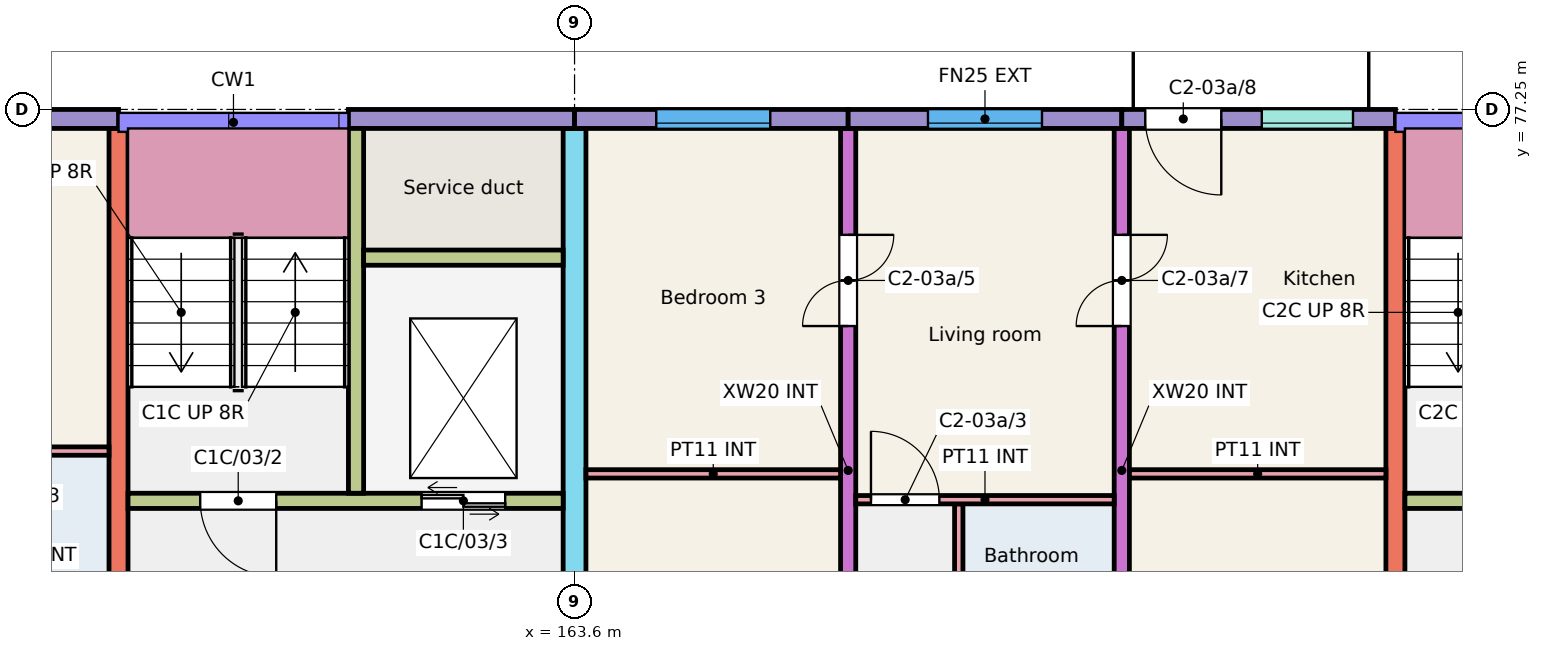
"""IFC4 building model, lengths in metres.
Left out: names, types, materials, properties, quantities, classifications, styles, units other than length and angle.
Written with IfcOpenShell. Run it as: python <this file> out.ifc"""

import sys

from ifc_helpers import new_model, si_unit, direction, frame, frame_2d, origin, place, context, subcontext, project, spatial, rectangle, extrude, element, fill, save


model = new_model("IFC4")
c1 = context("Model", 3, precision=1e-05, world=origin(), true_north=direction((0.0, 1.0)))
c2 = subcontext(c1, "Body", "Model", "MODEL_VIEW")
j1 = project(units=[si_unit("LENGTHUNIT", "METRE"), si_unit("PLANEANGLEUNIT", "RADIAN")], contexts=[c1])
p1 = place(None, origin())
s1 = spatial("IfcSite", under=j1, at=p1, CompositionType="ELEMENT")
p2 = place(p1, origin())
s2 = spatial("IfcBuilding", under=s1, at=p2, CompositionType="ELEMENT")
p3 = place(p2, frame((0.0, 0.0, 9.0)))
s3 = spatial("IfcBuildingStorey", under=s2, at=p3, CompositionType="ELEMENT", Elevation=9.0)
p4 = place(p3, frame((157.6, 68.0, 0.0), z_axis=(0.0, 0.0, 1.0), x_axis=(0.0, 1.0, 0.0)))
e1 = element("IfcWall", 1, at=p4, inside=s3, PredefinedType="SHEAR", context=c2, shape_type="SweptSolid", body=[
    extrude(rectangle(XDim=9.0, YDim=0.25, at=frame_2d((4.5, 0.0))), origin(), (0.0, 0.0, 1.0), 3.0),
])
p5 = place(p3, frame((163.6, 66.0, 0.0), z_axis=(0.0, 0.0, 1.0), x_axis=(0.0, 1.0, 0.0)))
e2 = element("IfcWall", 2, at=p5, inside=s3, PredefinedType="SHEAR", context=c2, shape_type="SweptSolid", body=[
    extrude(rectangle(XDim=11.0, YDim=0.3, at=frame_2d((5.5, 0.0))), origin(), (0.0, 0.0, 1.0), 3.0),
])
p6 = place(p5, frame((0.3, 0.0, 0.0)))
e3 = element("IfcOpeningElement", 3, at=p6, cuts=e2, PredefinedType="OPENING", context=c2, shape_type="SweptSolid", body=[
    extrude(rectangle(XDim=1.2, YDim=2.1, at=frame_2d((0.6, 1.05))), frame((0.0, 0.16, 0.0), z_axis=(0.0, -1.0, 0.0), x_axis=(1.0, 0.0, 0.0)), (0.0, 0.0, 1.0), 0.32),
])
p7 = place(p3, frame((167.2, 68.0, 0.0), z_axis=(0.0, 0.0, 1.0), x_axis=(0.0, 1.0, 0.0)))
e4 = element("IfcWall", 4, at=p7, inside=s3, PredefinedType="SHEAR", context=c2, shape_type="SweptSolid", body=[
    extrude(rectangle(XDim=9.0, YDim=0.2, at=frame_2d((4.5, 0.0))), origin(), (0.0, 0.0, 1.0), 3.0),
])
p8 = place(p7, frame((0.175, 0.0, 0.0)))
e5 = element("IfcOpeningElement", 5, at=p8, cuts=e4, PredefinedType="OPENING", context=c2, shape_type="SweptSolid", body=[
    extrude(rectangle(XDim=1.2, YDim=2.1, at=frame_2d((0.6, 1.05))), frame((0.0, 0.11, 0.0), z_axis=(0.0, -1.0, 0.0), x_axis=(1.0, 0.0, 0.0)), (0.0, 0.0, 1.0), 0.22),
])
p9 = place(p7, frame((6.4, 0.0, 0.0)))
e6 = element("IfcOpeningElement", 6, at=p9, cuts=e4, PredefinedType="OPENING", context=c2, shape_type="SweptSolid", body=[
    extrude(rectangle(XDim=1.2, YDim=2.1, at=frame_2d((0.6, 1.05))), frame((0.0, 0.11, 0.0), z_axis=(0.0, -1.0, 0.0), x_axis=(1.0, 0.0, 0.0)), (0.0, 0.0, 1.0), 0.22),
])
p10 = place(p3, frame((170.8, 68.0, 0.0), z_axis=(0.0, 0.0, 1.0), x_axis=(0.0, 1.0, 0.0)))
e7 = element("IfcWall", 7, at=p10, inside=s3, PredefinedType="SHEAR", context=c2, shape_type="SweptSolid", body=[
    extrude(rectangle(XDim=9.0, YDim=0.2, at=frame_2d((4.5, 0.0))), origin(), (0.0, 0.0, 1.0), 3.0),
])
p11 = place(p10, frame((0.175, 0.0, 0.0)))
e8 = element("IfcOpeningElement", 8, at=p11, cuts=e7, PredefinedType="OPENING", context=c2, shape_type="SweptSolid", body=[
    extrude(rectangle(XDim=1.2, YDim=2.1, at=frame_2d((0.6, 1.05))), frame((0.0, 0.11, 0.0), z_axis=(0.0, -1.0, 0.0), x_axis=(1.0, 0.0, 0.0)), (0.0, 0.0, 1.0), 0.22),
])
p12 = place(p10, frame((6.4, 0.0, 0.0)))
e9 = element("IfcOpeningElement", 9, at=p12, cuts=e7, PredefinedType="OPENING", context=c2, shape_type="SweptSolid", body=[
    extrude(rectangle(XDim=1.2, YDim=2.1, at=frame_2d((0.6, 1.05))), frame((0.0, 0.11, 0.0), z_axis=(0.0, -1.0, 0.0), x_axis=(1.0, 0.0, 0.0)), (0.0, 0.0, 1.0), 0.22),
])
p13 = place(p3, frame((174.4, 68.0, 0.0), z_axis=(0.0, 0.0, 1.0), x_axis=(0.0, 1.0, 0.0)))
e10 = element("IfcWall", 10, at=p13, inside=s3, PredefinedType="SHEAR", context=c2, shape_type="SweptSolid", body=[
    extrude(rectangle(XDim=9.0, YDim=0.25, at=frame_2d((4.5, 0.0))), origin(), (0.0, 0.0, 1.0), 3.0),
])
p14 = place(p3, frame((154.0, 77.125, 0.0), z_axis=(0.0, 0.0, 1.0), x_axis=(1.0, 0.0, 0.0)))
e11 = element("IfcWall", 11, at=p14, inside=s3, PredefinedType="SOLIDWALL", context=c2, shape_type="SweptSolid", body=[
    extrude(rectangle(XDim=3.6, YDim=0.25, at=frame_2d((1.8, 0.0))), origin(), (0.0, 0.0, 1.0), 3.0),
])
p15 = place(p14, frame((1.038, 0.0, 0.9)))
e12 = element("IfcOpeningElement", 12, at=p15, cuts=e11, PredefinedType="OPENING", context=c2, shape_type="SweptSolid", body=[
    extrude(rectangle(XDim=1.5, YDim=1.5, at=frame_2d((0.75, 0.75))), frame((0.0, 0.135, 0.0), z_axis=(0.0, -1.0, 0.0), x_axis=(1.0, 0.0, 0.0)), (0.0, 0.0, 1.0), 0.27),
])
p16 = place(p3, frame((160.625, 77.125, 0.0), z_axis=(0.0, 0.0, 1.0), x_axis=(1.0, 0.0, 0.0)))
e13 = element("IfcWall", 13, at=p16, inside=s3, PredefinedType="SOLIDWALL", context=c2, shape_type="SweptSolid", body=[
    extrude(rectangle(XDim=2.975, YDim=0.25, at=frame_2d((1.488, 0.0))), origin(), (0.0, 0.0, 1.0), 3.0),
])
p17 = place(p3, frame((157.725, 72.1, 0.0), z_axis=(0.0, 0.0, 1.0), x_axis=(1.0, 0.0, 0.0)))
e14 = element("IfcWall", 14, at=p17, inside=s3, PredefinedType="SHEAR", context=c2, shape_type="SweptSolid", body=[
    extrude(rectangle(XDim=5.725, YDim=0.2, at=frame_2d((2.862, 0.0))), origin(), (0.0, 0.0, 1.0), 3.0),
])
p18 = place(p17, frame((0.95, 0.0, 0.0)))
e15 = element("IfcOpeningElement", 15, at=p18, cuts=e14, PredefinedType="OPENING", context=c2, shape_type="SweptSolid", body=[
    extrude(rectangle(XDim=1.0, YDim=2.1, at=frame_2d((0.5, 1.05))), frame((0.0, 0.11, 0.0), z_axis=(0.0, -1.0, 0.0), x_axis=(1.0, 0.0, 0.0)), (0.0, 0.0, 1.0), 0.22),
])
p19 = place(p17, frame((3.863, 0.0, 0.0)))
e16 = element("IfcOpeningElement", 16, at=p19, cuts=e14, PredefinedType="OPENING", context=c2, shape_type="SweptSolid", body=[
    extrude(rectangle(XDim=1.1, YDim=2.1, at=frame_2d((0.55, 1.05))), frame((0.0, 0.11, 0.0), z_axis=(0.0, -1.0, 0.0), x_axis=(1.0, 0.0, 0.0)), (0.0, 0.0, 1.0), 0.22),
])
p20 = place(p3, frame((160.725, 72.2, 0.0), z_axis=(0.0, 0.0, 1.0), x_axis=(0.0, 1.0, 0.0)))
e17 = element("IfcWall", 17, at=p20, inside=s3, PredefinedType="SHEAR", context=c2, shape_type="SweptSolid", body=[
    extrude(rectangle(XDim=4.8, YDim=0.2, at=frame_2d((2.4, 0.0))), origin(), (0.0, 0.0, 1.0), 3.0),
])
p21 = place(p3, frame((160.825, 75.3, 0.0), z_axis=(0.0, 0.0, 1.0), x_axis=(1.0, 0.0, 0.0)))
e18 = element("IfcWall", 18, at=p21, inside=s3, PredefinedType="SHEAR", context=c2, shape_type="SweptSolid", body=[
    extrude(rectangle(XDim=2.625, YDim=0.2, at=frame_2d((1.312, 0.0))), origin(), (0.0, 0.0, 1.0), 3.0),
])
p22 = place(p3, frame((163.6, 77.125, 0.0), z_axis=(0.0, 0.0, 1.0), x_axis=(1.0, 0.0, 0.0)))
e19 = element("IfcWall", 19, at=p22, inside=s3, PredefinedType="SOLIDWALL", context=c2, shape_type="SweptSolid", body=[
    extrude(rectangle(XDim=3.6, YDim=0.25, at=frame_2d((1.8, 0.0))), origin(), (0.0, 0.0, 1.0), 3.0),
])
p23 = place(p22, frame((1.075, 0.0, 0.9)))
e20 = element("IfcOpeningElement", 20, at=p23, cuts=e19, PredefinedType="OPENING", context=c2, shape_type="SweptSolid", body=[
    extrude(rectangle(XDim=1.5, YDim=1.5, at=frame_2d((0.75, 0.75))), frame((0.0, 0.135, 0.0), z_axis=(0.0, -1.0, 0.0), x_axis=(1.0, 0.0, 0.0)), (0.0, 0.0, 1.0), 0.27),
])
p24 = place(p3, frame((167.2, 77.125, 0.0), z_axis=(0.0, 0.0, 1.0), x_axis=(1.0, 0.0, 0.0)))
e21 = element("IfcWall", 21, at=p24, inside=s3, PredefinedType="SOLIDWALL", context=c2, shape_type="SweptSolid", body=[
    extrude(rectangle(XDim=3.6, YDim=0.25, at=frame_2d((1.8, 0.0))), origin(), (0.0, 0.0, 1.0), 3.0),
])
p25 = place(p24, frame((1.05, 0.0, 0.9)))
e22 = element("IfcOpeningElement", 22, at=p25, cuts=e21, PredefinedType="OPENING", context=c2, shape_type="SweptSolid", body=[
    extrude(rectangle(XDim=1.5, YDim=1.5, at=frame_2d((0.75, 0.75))), frame((0.0, 0.135, 0.0), z_axis=(0.0, -1.0, 0.0), x_axis=(1.0, 0.0, 0.0)), (0.0, 0.0, 1.0), 0.27),
])
p26 = place(p3, frame((170.8, 77.125, 0.0), z_axis=(0.0, 0.0, 1.0), x_axis=(1.0, 0.0, 0.0)))
e23 = element("IfcWall", 23, at=p26, inside=s3, PredefinedType="SOLIDWALL", context=c2, shape_type="SweptSolid", body=[
    extrude(rectangle(XDim=3.6, YDim=0.25, at=frame_2d((1.8, 0.0))), origin(), (0.0, 0.0, 1.0), 3.0),
])
p27 = place(p26, frame((1.842, 0.0, 1.1)))
e24 = element("IfcOpeningElement", 24, at=p27, cuts=e23, PredefinedType="OPENING", context=c2, shape_type="SweptSolid", body=[
    extrude(rectangle(XDim=1.2, YDim=1.3, at=frame_2d((0.6, 0.65))), frame((0.0, 0.135, 0.0), z_axis=(0.0, -1.0, 0.0), x_axis=(1.0, 0.0, 0.0)), (0.0, 0.0, 1.0), 0.27),
])
p28 = place(p26, frame((0.309, 0.0, 0.0)))
e25 = element("IfcOpeningElement", 25, at=p28, cuts=e23, PredefinedType="OPENING", context=c2, shape_type="SweptSolid", body=[
    extrude(rectangle(XDim=1.0, YDim=2.1, at=frame_2d((0.5, 1.05))), frame((0.0, 0.135, 0.0), z_axis=(0.0, -1.0, 0.0), x_axis=(1.0, 0.0, 0.0)), (0.0, 0.0, 1.0), 0.27),
])
p29 = place(p3, frame((174.525, 72.1, 0.0), z_axis=(0.0, 0.0, 1.0), x_axis=(1.0, 0.0, 0.0)))
e26 = element("IfcWall", 26, at=p29, inside=s3, PredefinedType="SHEAR", context=c2, shape_type="SweptSolid", body=[
    extrude(rectangle(XDim=5.725, YDim=0.2, at=frame_2d((2.863, 0.0))), origin(), (0.0, 0.0, 1.0), 3.0),
])
p30 = place(p29, frame((0.95, 0.0, 0.0)))
e27 = element("IfcOpeningElement", 27, at=p30, cuts=e26, PredefinedType="OPENING", context=c2, shape_type="SweptSolid", body=[
    extrude(rectangle(XDim=1.0, YDim=2.1, at=frame_2d((0.5, 1.05))), frame((0.0, 0.11, 0.0), z_axis=(0.0, -1.0, 0.0), x_axis=(1.0, 0.0, 0.0)), (0.0, 0.0, 1.0), 0.22),
])
p31 = place(p29, frame((3.863, 0.0, 0.0)))
e28 = element("IfcOpeningElement", 28, at=p31, cuts=e26, PredefinedType="OPENING", context=c2, shape_type="SweptSolid", body=[
    extrude(rectangle(XDim=1.1, YDim=2.1, at=frame_2d((0.55, 1.05))), frame((0.0, 0.11, 0.0), z_axis=(0.0, -1.0, 0.0), x_axis=(1.0, 0.0, 0.0)), (0.0, 0.0, 1.0), 0.22),
])
p32 = place(p3, frame((154.1, 72.755, 0.0), z_axis=(0.0, 0.0, 1.0), x_axis=(1.0, 0.0, 0.0)))
e29 = element("IfcWall", 29, at=p32, inside=s3, PredefinedType="PARTITIONING", context=c2, shape_type="SweptSolid", body=[
    extrude(rectangle(XDim=3.375, YDim=0.11, at=frame_2d((1.688, 0.0))), origin(), (0.0, 0.0, 1.0), 2.8),
])
p33 = place(p32, frame((0.2, 0.0, 0.0)))
e30 = element("IfcOpeningElement", 30, at=p33, cuts=e29, PredefinedType="OPENING", context=c2, shape_type="SweptSolid", body=[
    extrude(rectangle(XDim=0.9, YDim=2.1, at=frame_2d((0.45, 1.05))), frame((0.0, 0.065, 0.0), z_axis=(0.0, -1.0, 0.0), x_axis=(1.0, 0.0, 0.0)), (0.0, 0.0, 1.0), 0.13),
])
p34 = place(p3, frame((168.655, 69.66, 0.0), z_axis=(0.0, 0.0, 1.0), x_axis=(0.0, 1.0, 0.0)))
e31 = element("IfcWall", 31, at=p34, inside=s3, PredefinedType="PARTITIONING", context=c2, shape_type="SweptSolid", body=[
    extrude(rectangle(XDim=2.4, YDim=0.11, at=frame_2d((1.2, 0.0))), origin(), (0.0, 0.0, 1.0), 2.8),
])
p35 = place(p3, frame((167.3, 72.115, 0.0), z_axis=(0.0, 0.0, 1.0), x_axis=(1.0, 0.0, 0.0)))
e32 = element("IfcWall", 32, at=p35, inside=s3, PredefinedType="PARTITIONING", context=c2, shape_type="SweptSolid", body=[
    extrude(rectangle(XDim=3.4, YDim=0.11, at=frame_2d((1.7, 0.0))), origin(), (0.0, 0.0, 1.0), 2.8),
])
p36 = place(p35, frame((0.2, 0.0, 0.0)))
e33 = element("IfcOpeningElement", 33, at=p36, cuts=e32, PredefinedType="OPENING", context=c2, shape_type="SweptSolid", body=[
    extrude(rectangle(XDim=0.9, YDim=2.1, at=frame_2d((0.45, 1.05))), frame((0.0, 0.065, 0.0), z_axis=(0.0, -1.0, 0.0), x_axis=(1.0, 0.0, 0.0)), (0.0, 0.0, 1.0), 0.13),
])
p37 = place(p3, frame((163.75, 72.455, 0.0), z_axis=(0.0, 0.0, 1.0), x_axis=(1.0, 0.0, 0.0)))
e34 = element("IfcWall", 34, at=p37, inside=s3, PredefinedType="PARTITIONING", context=c2, shape_type="SweptSolid", body=[
    extrude(rectangle(XDim=3.35, YDim=0.11, at=frame_2d((1.675, 0.0))), origin(), (0.0, 0.0, 1.0), 2.8),
])
p38 = place(p3, frame((170.9, 72.455, 0.0), z_axis=(0.0, 0.0, 1.0), x_axis=(1.0, 0.0, 0.0)))
e35 = element("IfcWall", 35, at=p38, inside=s3, PredefinedType="PARTITIONING", context=c2, shape_type="SweptSolid", body=[
    extrude(rectangle(XDim=3.375, YDim=0.11, at=frame_2d((1.688, 0.0))), origin(), (0.0, 0.0, 1.0), 2.8),
])
p39 = place(p23, origin())
e36 = element("IfcWindow", 36, at=p39, inside=s3, PartitioningType="SINGLE_PANEL", PredefinedType="WINDOW", context=c2, shape_type="SweptSolid", body=[
    extrude(rectangle(XDim=1.5, YDim=1.5, at=frame_2d((0.75, 0.75))), frame((0.0, -0.025, 0.0), z_axis=(0.0, -1.0, 0.0), x_axis=(1.0, 0.0, 0.0)), (0.0, 0.0, 1.0), 0.06),
])
fill(e20, e36)
p40 = place(p27, origin())
e37 = element("IfcWindow", 37, at=p40, inside=s3, PartitioningType="SINGLE_PANEL", PredefinedType="WINDOW", context=c2, shape_type="SweptSolid", body=[
    extrude(rectangle(XDim=1.2, YDim=1.3, at=frame_2d((0.6, 0.65))), frame((0.0, -0.025, 0.0), z_axis=(0.0, -1.0, 0.0), x_axis=(1.0, 0.0, 0.0)), (0.0, 0.0, 1.0), 0.06),
])
fill(e24, e37)
p41 = place(p25, origin())
e38 = element("IfcWindow", 38, at=p41, inside=s3, PartitioningType="SINGLE_PANEL", PredefinedType="WINDOW", context=c2, shape_type="SweptSolid", body=[
    extrude(rectangle(XDim=1.5, YDim=1.5, at=frame_2d((0.75, 0.75))), frame((0.0, -0.025, 0.0), z_axis=(0.0, -1.0, 0.0), x_axis=(1.0, 0.0, 0.0)), (0.0, 0.0, 1.0), 0.06),
])
fill(e22, e38)
p42 = place(p36, origin())
e39 = element("IfcDoor", 39, at=p42, inside=s3, OperationType="SINGLE_SWING_LEFT", PredefinedType="DOOR", context=c2, shape_type="SweptSolid", body=[
    extrude(rectangle(XDim=0.9, YDim=2.1, at=frame_2d((0.45, 1.05))), frame((0.0, 0.025, 0.0), z_axis=(0.0, -1.0, 0.0), x_axis=(1.0, 0.0, 0.0)), (0.0, 0.0, 1.0), 0.05),
])
fill(e33, e39)
p43 = place(p9, origin())
e40 = element("IfcDoor", 40, at=p43, inside=s3, OperationType="DOUBLE_DOOR_SINGLE_SWING", PredefinedType="DOOR", context=c2, shape_type="SweptSolid", body=[
    extrude(rectangle(XDim=1.2, YDim=2.1, at=frame_2d((0.6, 1.05))), frame((0.0, 0.025, 0.0), z_axis=(0.0, -1.0, 0.0), x_axis=(1.0, 0.0, 0.0)), (0.0, 0.0, 1.0), 0.05),
])
fill(e6, e40)
p44 = place(p12, origin())
e41 = element("IfcDoor", 41, at=p44, inside=s3, OperationType="DOUBLE_DOOR_SINGLE_SWING", PredefinedType="DOOR", context=c2, shape_type="SweptSolid", body=[
    extrude(rectangle(XDim=1.2, YDim=2.1, at=frame_2d((0.6, 1.05))), frame((0.0, 0.025, 0.0), z_axis=(0.0, -1.0, 0.0), x_axis=(1.0, 0.0, 0.0)), (0.0, 0.0, 1.0), 0.05),
])
fill(e9, e41)
p45 = place(p28, origin())
e42 = element("IfcDoor", 42, at=p45, inside=s3, OperationType="SINGLE_SWING_RIGHT", PredefinedType="DOOR", context=c2, shape_type="SweptSolid", body=[
    extrude(rectangle(XDim=1.0, YDim=2.1, at=frame_2d((0.5, 1.05))), frame((0.0, 0.025, 0.0), z_axis=(0.0, -1.0, 0.0), x_axis=(1.0, 0.0, 0.0)), (0.0, 0.0, 1.0), 0.05),
])
fill(e25, e42)
p46 = place(p18, origin())
e43 = element("IfcDoor", 43, at=p46, inside=s3, OperationType="SINGLE_SWING_RIGHT", PredefinedType="DOOR", context=c2, shape_type="SweptSolid", body=[
    extrude(rectangle(XDim=1.0, YDim=2.1, at=frame_2d((0.5, 1.05))), frame((0.0, 0.025, 0.0), z_axis=(0.0, -1.0, 0.0), x_axis=(1.0, 0.0, 0.0)), (0.0, 0.0, 1.0), 0.05),
])
fill(e15, e43)
p47 = place(p19, origin())
e44 = element("IfcDoor", 44, at=p47, inside=s3, OperationType="DOUBLE_DOOR_SLIDING", PredefinedType="DOOR", context=c2, shape_type="SweptSolid", body=[
    extrude(rectangle(XDim=1.1, YDim=2.1, at=frame_2d((0.55, 1.05))), frame((0.0, 0.025, 0.0), z_axis=(0.0, -1.0, 0.0), x_axis=(1.0, 0.0, 0.0)), (0.0, 0.0, 1.0), 0.05),
])
fill(e16, e44)
save(model, sys.argv[1])
